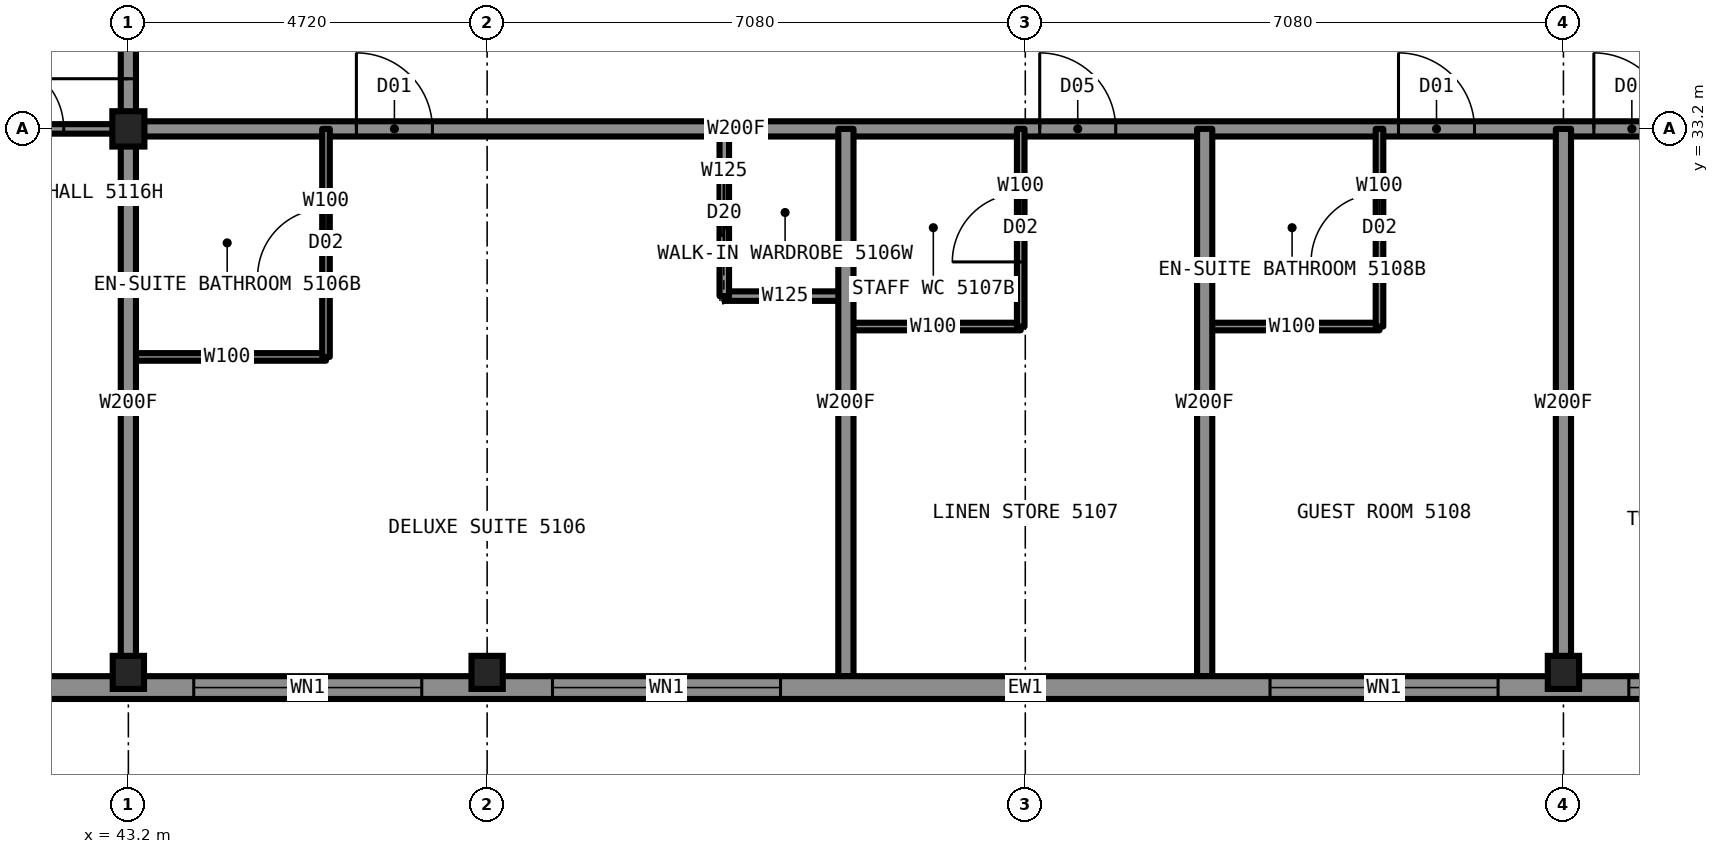
"""IFC4 building model, lengths in metres.
Left out: names, types, materials, properties, quantities, classifications, styles, units other than length and angle.
Written with IfcOpenShell. Run it as: python <this file> out.ifc"""

import sys

from ifc_helpers import new_model, si_unit, direction, frame, frame_2d, origin, origin_2d, place, context, subcontext, project, spatial, rectangle, i_section, extrude, element, fill, save


model = new_model("IFC4")
c1 = context("Model", 3, precision=1e-05, world=origin(), true_north=direction((0.0, 1.0)))
c2 = subcontext(c1, "Body", "Model", "MODEL_VIEW")
j1 = project(units=[si_unit("LENGTHUNIT", "METRE"), si_unit("PLANEANGLEUNIT", "RADIAN")], contexts=[c1])
p1 = place(None, origin())
s1 = spatial("IfcSite", under=j1, at=p1, CompositionType="ELEMENT")
p2 = place(p1, origin())
s2 = spatial("IfcBuilding", under=s1, at=p2, CompositionType="ELEMENT")
p3 = place(p2, frame((0.0, 0.0, 182.8)))
s3 = spatial("IfcBuildingStorey", under=s2, at=p3, CompositionType="ELEMENT", Elevation=182.8)
for number, where, z_axis, x_axis in (
    (1, (43.2, 26.05, 0.0), (0.0, 0.0, 1.0), (1.0, 0.0, 0.0)),
    (2, (47.92, 26.05, 0.0), (0.0, 0.0, 1.0), (1.0, 0.0, 0.0)),
    (3, (62.08, 26.05, 0.0), (0.0, 0.0, 1.0), (1.0, 0.0, 0.0)),
):
    element("IfcColumn", number, at=place(p3, frame(where, z_axis=z_axis, x_axis=x_axis)), inside=s3, PredefinedType="COLUMN", context=c2, shape_type="SweptSolid", body=[
        extrude(i_section(OverallWidth=0.411, OverallDepth=0.434, WebThickness=0.036, FlangeThickness=0.057, at=origin_2d()), origin(), (0.0, 0.0, 1.0), 3.5),
    ])
p4 = place(p3, frame((43.2, 33.2, 0.0), z_axis=(0.0, 0.0, 1.0), x_axis=(1.0, 0.0, 0.0)))
e4 = element("IfcColumn", 4, at=p4, inside=s3, PredefinedType="COLUMN", context=c2, shape_type="SweptSolid", body=[
    extrude(i_section(OverallWidth=0.422, OverallDepth=0.465, WebThickness=0.045, FlangeThickness=0.073, at=origin_2d()), origin(), (0.0, 0.0, 1.0), 3.5),
])
p5 = place(p3, frame((43.2, 33.2, 0.0), z_axis=(0.0, 0.0, 1.0), x_axis=(1.0, 0.0, 0.0)))
e5 = element("IfcWall", 5, at=p5, inside=s3, PredefinedType="PARTITIONING", context=c2, shape_type="SweptSolid", body=[
    extrude(rectangle(XDim=23.6, YDim=0.2, at=frame_2d((11.8, 0.0))), origin(), (0.0, 0.0, 1.0), 3.33),
])
p6 = place(p5, frame((3.0, 0.0, 0.0)))
e6 = element("IfcOpeningElement", 6, at=p6, cuts=e5, PredefinedType="OPENING", context=c2, shape_type="SweptSolid", body=[
    extrude(rectangle(XDim=1.0, YDim=2.2, at=frame_2d((0.5, 1.1))), frame((0.0, 0.11, 0.0), z_axis=(0.0, -1.0, 0.0), x_axis=(1.0, 0.0, 0.0)), (0.0, 0.0, 1.0), 0.22),
])
p7 = place(p5, frame((11.99, 0.0, 0.0)))
e7 = element("IfcOpeningElement", 7, at=p7, cuts=e5, PredefinedType="OPENING", context=c2, shape_type="SweptSolid", body=[
    extrude(rectangle(XDim=1.0, YDim=2.2, at=frame_2d((0.5, 1.1))), frame((0.0, 0.11, 0.0), z_axis=(0.0, -1.0, 0.0), x_axis=(1.0, 0.0, 0.0)), (0.0, 0.0, 1.0), 0.22),
])
p8 = place(p5, frame((16.71, 0.0, 0.0)))
e8 = element("IfcOpeningElement", 8, at=p8, cuts=e5, PredefinedType="OPENING", context=c2, shape_type="SweptSolid", body=[
    extrude(rectangle(XDim=1.0, YDim=2.2, at=frame_2d((0.5, 1.1))), frame((0.0, 0.11, 0.0), z_axis=(0.0, -1.0, 0.0), x_axis=(1.0, 0.0, 0.0)), (0.0, 0.0, 1.0), 0.22),
])
p9 = place(p5, frame((19.28, 0.0, 0.0)))
e9 = element("IfcOpeningElement", 9, at=p9, cuts=e5, PredefinedType="OPENING", context=c2, shape_type="SweptSolid", body=[
    extrude(rectangle(XDim=1.0, YDim=2.2, at=frame_2d((0.5, 1.1))), frame((0.0, 0.11, 0.0), z_axis=(0.0, -1.0, 0.0), x_axis=(1.0, 0.0, 0.0)), (0.0, 0.0, 1.0), 0.22),
])
p10 = place(p3, frame((36.0, 33.2, 0.0), z_axis=(0.0, 0.0, 1.0), x_axis=(1.0, 0.0, 0.0)))
e10 = element("IfcWall", 10, at=p10, inside=s3, PredefinedType="PARTITIONING", context=c2, shape_type="SweptSolid", body=[
    extrude(rectangle(XDim=7.2, YDim=0.125, at=frame_2d((3.6, 0.0))), origin(), (0.0, 0.0, 1.0), 2.573),
])
p11 = place(p10, frame((5.45, 0.0, 0.0)))
e11 = element("IfcOpeningElement", 11, at=p11, cuts=e10, PredefinedType="OPENING", context=c2, shape_type="SweptSolid", body=[
    extrude(rectangle(XDim=0.9, YDim=2.2, at=frame_2d((0.45, 1.1))), frame((0.0, 0.073, 0.0), z_axis=(0.0, -1.0, 0.0), x_axis=(1.0, 0.0, 0.0)), (0.0, 0.0, 1.0), 0.145),
])
p12 = place(p3, frame((51.04, 31.0, 0.0), z_axis=(0.0, 0.0, 1.0), x_axis=(1.0, 0.0, 0.0)))
e12 = element("IfcWall", 12, at=p12, inside=s3, PredefinedType="PARTITIONING", context=c2, shape_type="SweptSolid", body=[
    extrude(rectangle(XDim=1.6, YDim=0.125, at=frame_2d((0.8, 0.0))), origin(), (0.0, 0.0, 1.0), 3.33),
])
p13 = place(p3, frame((52.64, 30.6, 0.0), z_axis=(0.0, 0.0, 1.0), x_axis=(1.0, 0.0, 0.0)))
e13 = element("IfcWall", 13, at=p13, inside=s3, PredefinedType="PARTITIONING", context=c2, shape_type="SweptSolid", body=[
    extrude(rectangle(XDim=2.3, YDim=0.1, at=frame_2d((1.15, 0.0))), origin(), (0.0, 0.0, 1.0), 3.33),
])
p14 = place(p3, frame((57.36, 30.6, 0.0), z_axis=(0.0, 0.0, 1.0), x_axis=(1.0, 0.0, 0.0)))
e14 = element("IfcWall", 14, at=p14, inside=s3, PredefinedType="PARTITIONING", context=c2, shape_type="SweptSolid", body=[
    extrude(rectangle(XDim=2.3, YDim=0.1, at=frame_2d((1.15, 0.0))), origin(), (0.0, 0.0, 1.0), 3.33),
])
p15 = place(p3, frame((43.2, 30.2, 0.0), z_axis=(0.0, 0.0, 1.0), x_axis=(1.0, 0.0, 0.0)))
e15 = element("IfcWall", 15, at=p15, inside=s3, PredefinedType="PARTITIONING", context=c2, shape_type="SweptSolid", body=[
    extrude(rectangle(XDim=2.6, YDim=0.1, at=frame_2d((1.3, 0.0))), origin(), (0.0, 0.0, 1.0), 3.33),
])
p16 = place(p3, frame((54.94, 30.6, 0.0), z_axis=(0.0, 0.0, 1.0), x_axis=(0.0, 1.0, 0.0)))
e16 = element("IfcWall", 16, at=p16, inside=s3, PredefinedType="PARTITIONING", context=c2, shape_type="SweptSolid", body=[
    extrude(rectangle(XDim=2.6, YDim=0.1, at=frame_2d((1.3, 0.0))), origin(), (0.0, 0.0, 1.0), 2.573),
])
p17 = place(p16, frame((0.85, 0.0, 0.0)))
e17 = element("IfcOpeningElement", 17, at=p17, cuts=e16, PredefinedType="OPENING", context=c2, shape_type="SweptSolid", body=[
    extrude(rectangle(XDim=0.9, YDim=2.1, at=frame_2d((0.45, 1.05))), frame((0.0, 0.06, 0.0), z_axis=(0.0, -1.0, 0.0), x_axis=(1.0, 0.0, 0.0)), (0.0, 0.0, 1.0), 0.12),
])
p18 = place(p3, frame((43.2, 33.2, 0.0), z_axis=(0.0, 0.0, 1.0), x_axis=(0.0, 1.0, 0.0)))
e18 = element("IfcWall", 18, at=p18, inside=s3, PredefinedType="PARTITIONING", context=c2, shape_type="SweptSolid", body=[
    extrude(rectangle(XDim=4.72, YDim=0.2, at=frame_2d((2.36, 0.0))), origin(), (0.0, 0.0, 1.0), 3.33),
])
p19 = place(p18, frame((0.66, 0.0, 0.0)))
e19 = element("IfcOpeningElement", 19, at=p19, cuts=e18, PredefinedType="OPENING", context=c2, shape_type="SweptSolid", body=[
    extrude(rectangle(XDim=1.1, YDim=2.2, at=frame_2d((0.55, 1.1))), frame((0.0, 0.11, 0.0), z_axis=(0.0, -1.0, 0.0), x_axis=(1.0, 0.0, 0.0)), (0.0, 0.0, 1.0), 0.22),
])
p20 = place(p3, frame((43.2, 26.0, 0.0), z_axis=(0.0, 0.0, 1.0), x_axis=(0.0, 1.0, 0.0)))
e20 = element("IfcWall", 20, at=p20, inside=s3, PredefinedType="PARTITIONING", context=c2, shape_type="SweptSolid", body=[
    extrude(rectangle(XDim=7.2, YDim=0.2, at=frame_2d((3.6, 0.0))), origin(), (0.0, 0.0, 1.0), 2.573),
])
p21 = place(p3, frame((52.64, 26.0, 0.0), z_axis=(0.0, 0.0, 1.0), x_axis=(0.0, 1.0, 0.0)))
e21 = element("IfcWall", 21, at=p21, inside=s3, PredefinedType="PARTITIONING", context=c2, shape_type="SweptSolid", body=[
    extrude(rectangle(XDim=7.2, YDim=0.2, at=frame_2d((3.6, 0.0))), origin(), (0.0, 0.0, 1.0), 3.33),
])
p22 = place(p3, frame((51.04, 31.0, 0.0), z_axis=(0.0, 0.0, 1.0), x_axis=(0.0, 1.0, 0.0)))
e22 = element("IfcWall", 22, at=p22, inside=s3, PredefinedType="PARTITIONING", context=c2, shape_type="SweptSolid", body=[
    extrude(rectangle(XDim=2.2, YDim=0.125, at=frame_2d((1.1, 0.0))), origin(), (0.0, 0.0, 1.0), 3.33),
])
p23 = place(p22, frame((0.7, 0.0, 0.0)))
e23 = element("IfcOpeningElement", 23, at=p23, cuts=e22, PredefinedType="OPENING", context=c2, shape_type="SweptSolid", body=[
    extrude(rectangle(XDim=0.8, YDim=2.1, at=frame_2d((0.4, 1.05))), frame((0.0, 0.073, 0.0), z_axis=(0.0, -1.0, 0.0), x_axis=(1.0, 0.0, 0.0)), (0.0, 0.0, 1.0), 0.145),
])
p24 = place(p3, frame((45.8, 30.2, 0.0), z_axis=(0.0, 0.0, 1.0), x_axis=(0.0, 1.0, 0.0)))
e24 = element("IfcWall", 24, at=p24, inside=s3, PredefinedType="PARTITIONING", context=c2, shape_type="SweptSolid", body=[
    extrude(rectangle(XDim=3.0, YDim=0.1, at=frame_2d((1.5, 0.0))), origin(), (0.0, 0.0, 1.0), 3.33),
])
p25 = place(p24, frame((1.05, 0.0, 0.0)))
e25 = element("IfcOpeningElement", 25, at=p25, cuts=e24, PredefinedType="OPENING", context=c2, shape_type="SweptSolid", body=[
    extrude(rectangle(XDim=0.9, YDim=2.1, at=frame_2d((0.45, 1.05))), frame((0.0, 0.06, 0.0), z_axis=(0.0, -1.0, 0.0), x_axis=(1.0, 0.0, 0.0)), (0.0, 0.0, 1.0), 0.12),
])
p26 = place(p3, frame((57.36, 26.0, 0.0), z_axis=(0.0, 0.0, 1.0), x_axis=(0.0, 1.0, 0.0)))
e26 = element("IfcWall", 26, at=p26, inside=s3, PredefinedType="PARTITIONING", context=c2, shape_type="SweptSolid", body=[
    extrude(rectangle(XDim=7.2, YDim=0.2, at=frame_2d((3.6, 0.0))), origin(), (0.0, 0.0, 1.0), 3.33),
])
p27 = place(p3, frame((59.66, 30.6, 0.0), z_axis=(0.0, 0.0, 1.0), x_axis=(0.0, 1.0, 0.0)))
e27 = element("IfcWall", 27, at=p27, inside=s3, PredefinedType="PARTITIONING", context=c2, shape_type="SweptSolid", body=[
    extrude(rectangle(XDim=2.6, YDim=0.1, at=frame_2d((1.3, 0.0))), origin(), (0.0, 0.0, 1.0), 3.33),
])
p28 = place(p27, frame((0.85, 0.0, 0.0)))
e28 = element("IfcOpeningElement", 28, at=p28, cuts=e27, PredefinedType="OPENING", context=c2, shape_type="SweptSolid", body=[
    extrude(rectangle(XDim=0.9, YDim=2.1, at=frame_2d((0.45, 1.05))), frame((0.0, 0.06, 0.0), z_axis=(0.0, -1.0, 0.0), x_axis=(1.0, 0.0, 0.0)), (0.0, 0.0, 1.0), 0.12),
])
p29 = place(p3, frame((62.08, 26.0, 0.0), z_axis=(0.0, 0.0, 1.0), x_axis=(0.0, 1.0, 0.0)))
e29 = element("IfcWall", 29, at=p29, inside=s3, PredefinedType="PARTITIONING", context=c2, shape_type="SweptSolid", body=[
    extrude(rectangle(XDim=7.2, YDim=0.2, at=frame_2d((3.6, 0.0))), origin(), (0.0, 0.0, 1.0), 2.573),
])
p30 = place(p3, frame((41.2, 25.85, 0.0), z_axis=(0.0, 0.0, 1.0), x_axis=(1.0, 0.0, 0.0)))
e30 = element("IfcWall", 30, at=p30, inside=s3, PredefinedType="SOLIDWALL", context=c2, shape_type="SweptSolid", body=[
    extrude(rectangle(XDim=27.6, YDim=0.3, at=frame_2d((13.8, 0.0))), origin(), (0.0, 0.0, 1.0), 2.83),
])
p31 = place(p30, frame((2.86, 0.0, 0.3)))
e31 = element("IfcOpeningElement", 31, at=p31, cuts=e30, PredefinedType="OPENING", context=c2, shape_type="SweptSolid", body=[
    extrude(rectangle(XDim=3.0, YDim=2.0, at=frame_2d((1.5, 1.0))), frame((0.0, 0.16, 0.0), z_axis=(0.0, -1.0, 0.0), x_axis=(1.0, 0.0, 0.0)), (0.0, 0.0, 1.0), 0.32),
])
p32 = place(p30, frame((9.88, 0.0, 0.3)))
e32 = element("IfcOpeningElement", 32, at=p32, cuts=e30, PredefinedType="OPENING", context=c2, shape_type="SweptSolid", body=[
    extrude(rectangle(XDim=0.7, YDim=1.1, at=frame_2d((0.35, 0.55))), frame((0.0, 0.16, 0.0), z_axis=(0.0, -1.0, 0.0), x_axis=(1.0, 0.0, 0.0)), (0.0, 0.0, 1.0), 0.32),
])
p33 = place(p30, frame((12.3, 0.0, 0.3)))
e33 = element("IfcOpeningElement", 33, at=p33, cuts=e30, PredefinedType="OPENING", context=c2, shape_type="SweptSolid", body=[
    extrude(rectangle(XDim=3.0, YDim=2.0, at=frame_2d((1.5, 1.0))), frame((0.0, 0.16, 0.0), z_axis=(0.0, -1.0, 0.0), x_axis=(1.0, 0.0, 0.0)), (0.0, 0.0, 1.0), 0.32),
])
p34 = place(p30, frame((17.02, 0.0, 0.3)))
e34 = element("IfcOpeningElement", 34, at=p34, cuts=e30, PredefinedType="OPENING", context=c2, shape_type="SweptSolid", body=[
    extrude(rectangle(XDim=0.7, YDim=1.1, at=frame_2d((0.35, 0.55))), frame((0.0, 0.16, 0.0), z_axis=(0.0, -1.0, 0.0), x_axis=(1.0, 0.0, 0.0)), (0.0, 0.0, 1.0), 0.32),
])
p35 = place(p30, frame((21.74, 0.0, 0.3)))
e35 = element("IfcOpeningElement", 35, at=p35, cuts=e30, PredefinedType="OPENING", context=c2, shape_type="SweptSolid", body=[
    extrude(rectangle(XDim=3.0, YDim=2.0, at=frame_2d((1.5, 1.0))), frame((0.0, 0.16, 0.0), z_axis=(0.0, -1.0, 0.0), x_axis=(1.0, 0.0, 0.0)), (0.0, 0.0, 1.0), 0.32),
])
p36 = place(p6, origin())
e36 = element("IfcDoor", 36, at=p36, inside=s3, OperationType="SINGLE_SWING_LEFT", PredefinedType="DOOR", context=c2, shape_type="SweptSolid", body=[
    extrude(rectangle(XDim=1.0, YDim=2.2, at=frame_2d((0.5, 1.1))), frame((0.0, 0.025, 0.0), z_axis=(0.0, -1.0, 0.0), x_axis=(1.0, 0.0, 0.0)), (0.0, 0.0, 1.0), 0.05),
])
fill(e6, e36)
p37 = place(p25, origin())
e37 = element("IfcDoor", 37, at=p37, inside=s3, OperationType="SINGLE_SWING_RIGHT", PredefinedType="DOOR", context=c2, shape_type="SweptSolid", body=[
    extrude(rectangle(XDim=0.9, YDim=2.1, at=frame_2d((0.45, 1.05))), frame((0.0, 0.025, 0.0), z_axis=(0.0, -1.0, 0.0), x_axis=(1.0, 0.0, 0.0)), (0.0, 0.0, 1.0), 0.05),
])
fill(e25, e37)
p38 = place(p23, origin())
e38 = element("IfcDoor", 38, at=p38, inside=s3, OperationType="SLIDING_TO_LEFT", PredefinedType="DOOR", context=c2, shape_type="SweptSolid", body=[
    extrude(rectangle(XDim=0.8, YDim=2.1, at=frame_2d((0.4, 1.05))), frame((0.0, 0.025, 0.0), z_axis=(0.0, -1.0, 0.0), x_axis=(1.0, 0.0, 0.0)), (0.0, 0.0, 1.0), 0.05),
])
fill(e23, e38)
p39 = place(p7, origin())
e39 = element("IfcDoor", 39, at=p39, inside=s3, OperationType="SINGLE_SWING_LEFT", PredefinedType="DOOR", context=c2, shape_type="SweptSolid", body=[
    extrude(rectangle(XDim=1.0, YDim=2.2, at=frame_2d((0.5, 1.1))), frame((0.0, 0.025, 0.0), z_axis=(0.0, -1.0, 0.0), x_axis=(1.0, 0.0, 0.0)), (0.0, 0.0, 1.0), 0.05),
])
fill(e7, e39)
p40 = place(p17, origin())
e40 = element("IfcDoor", 40, at=p40, inside=s3, OperationType="SINGLE_SWING_RIGHT", PredefinedType="DOOR", context=c2, shape_type="SweptSolid", body=[
    extrude(rectangle(XDim=0.9, YDim=2.1, at=frame_2d((0.45, 1.05))), frame((0.0, 0.025, 0.0), z_axis=(0.0, -1.0, 0.0), x_axis=(1.0, 0.0, 0.0)), (0.0, 0.0, 1.0), 0.05),
])
fill(e17, e40)
p41 = place(p8, origin())
e41 = element("IfcDoor", 41, at=p41, inside=s3, OperationType="SINGLE_SWING_LEFT", PredefinedType="DOOR", context=c2, shape_type="SweptSolid", body=[
    extrude(rectangle(XDim=1.0, YDim=2.2, at=frame_2d((0.5, 1.1))), frame((0.0, 0.025, 0.0), z_axis=(0.0, -1.0, 0.0), x_axis=(1.0, 0.0, 0.0)), (0.0, 0.0, 1.0), 0.05),
])
fill(e8, e41)
p42 = place(p28, origin())
e42 = element("IfcDoor", 42, at=p42, inside=s3, OperationType="SINGLE_SWING_RIGHT", PredefinedType="DOOR", context=c2, shape_type="SweptSolid", body=[
    extrude(rectangle(XDim=0.9, YDim=2.1, at=frame_2d((0.45, 1.05))), frame((0.0, 0.025, 0.0), z_axis=(0.0, -1.0, 0.0), x_axis=(1.0, 0.0, 0.0)), (0.0, 0.0, 1.0), 0.05),
])
fill(e28, e42)
p43 = place(p9, origin())
e43 = element("IfcDoor", 43, at=p43, inside=s3, OperationType="SINGLE_SWING_LEFT", PredefinedType="DOOR", context=c2, shape_type="SweptSolid", body=[
    extrude(rectangle(XDim=1.0, YDim=2.2, at=frame_2d((0.5, 1.1))), frame((0.0, 0.025, 0.0), z_axis=(0.0, -1.0, 0.0), x_axis=(1.0, 0.0, 0.0)), (0.0, 0.0, 1.0), 0.05),
])
fill(e9, e43)
p44 = place(p11, origin())
e44 = element("IfcDoor", 44, at=p44, inside=s3, OperationType="SINGLE_SWING_LEFT", PredefinedType="DOOR", context=c2, shape_type="SweptSolid", body=[
    extrude(rectangle(XDim=0.9, YDim=2.2, at=frame_2d((0.45, 1.1))), frame((0.0, 0.025, 0.0), z_axis=(0.0, -1.0, 0.0), x_axis=(1.0, 0.0, 0.0)), (0.0, 0.0, 1.0), 0.05),
])
fill(e11, e44)
p45 = place(p19, origin())
e45 = element("IfcDoor", 45, at=p45, inside=s3, OperationType="SINGLE_SWING_LEFT", PredefinedType="DOOR", context=c2, shape_type="SweptSolid", body=[
    extrude(rectangle(XDim=1.1, YDim=2.2, at=frame_2d((0.55, 1.1))), frame((0.0, 0.025, 0.0), z_axis=(0.0, -1.0, 0.0), x_axis=(1.0, 0.0, 0.0)), (0.0, 0.0, 1.0), 0.05),
])
fill(e19, e45)
p46 = place(p31, origin())
e46 = element("IfcWindow", 46, at=p46, inside=s3, PartitioningType="SINGLE_PANEL", PredefinedType="WINDOW", context=c2, shape_type="SweptSolid", body=[
    extrude(rectangle(XDim=3.0, YDim=2.0, at=frame_2d((1.5, 1.0))), frame((0.0, 0.13, 0.0), z_axis=(0.0, -1.0, 0.0), x_axis=(1.0, 0.0, 0.0)), (0.0, 0.0, 1.0), 0.06),
])
fill(e31, e46)
p47 = place(p32, origin())
e47 = element("IfcWindow", 47, at=p47, inside=s3, PartitioningType="SINGLE_PANEL", PredefinedType="WINDOW", context=c2, shape_type="SweptSolid", body=[
    extrude(rectangle(XDim=0.7, YDim=1.1, at=frame_2d((0.35, 0.55))), frame((0.0, 0.13, 0.0), z_axis=(0.0, -1.0, 0.0), x_axis=(1.0, 0.0, 0.0)), (0.0, 0.0, 1.0), 0.06),
])
fill(e32, e47)
p48 = place(p33, origin())
e48 = element("IfcWindow", 48, at=p48, inside=s3, PartitioningType="SINGLE_PANEL", PredefinedType="WINDOW", context=c2, shape_type="SweptSolid", body=[
    extrude(rectangle(XDim=3.0, YDim=2.0, at=frame_2d((1.5, 1.0))), frame((0.0, 0.13, 0.0), z_axis=(0.0, -1.0, 0.0), x_axis=(1.0, 0.0, 0.0)), (0.0, 0.0, 1.0), 0.06),
])
fill(e33, e48)
p49 = place(p34, origin())
e49 = element("IfcWindow", 49, at=p49, inside=s3, PartitioningType="SINGLE_PANEL", PredefinedType="WINDOW", context=c2, shape_type="SweptSolid", body=[
    extrude(rectangle(XDim=0.7, YDim=1.1, at=frame_2d((0.35, 0.55))), frame((0.0, 0.13, 0.0), z_axis=(0.0, -1.0, 0.0), x_axis=(1.0, 0.0, 0.0)), (0.0, 0.0, 1.0), 0.06),
])
fill(e34, e49)
p50 = place(p35, origin())
e50 = element("IfcWindow", 50, at=p50, inside=s3, PartitioningType="SINGLE_PANEL", PredefinedType="WINDOW", context=c2, shape_type="SweptSolid", body=[
    extrude(rectangle(XDim=3.0, YDim=2.0, at=frame_2d((1.5, 1.0))), frame((0.0, 0.13, 0.0), z_axis=(0.0, -1.0, 0.0), x_axis=(1.0, 0.0, 0.0)), (0.0, 0.0, 1.0), 0.06),
])
fill(e35, e50)
save(model, sys.argv[1])
